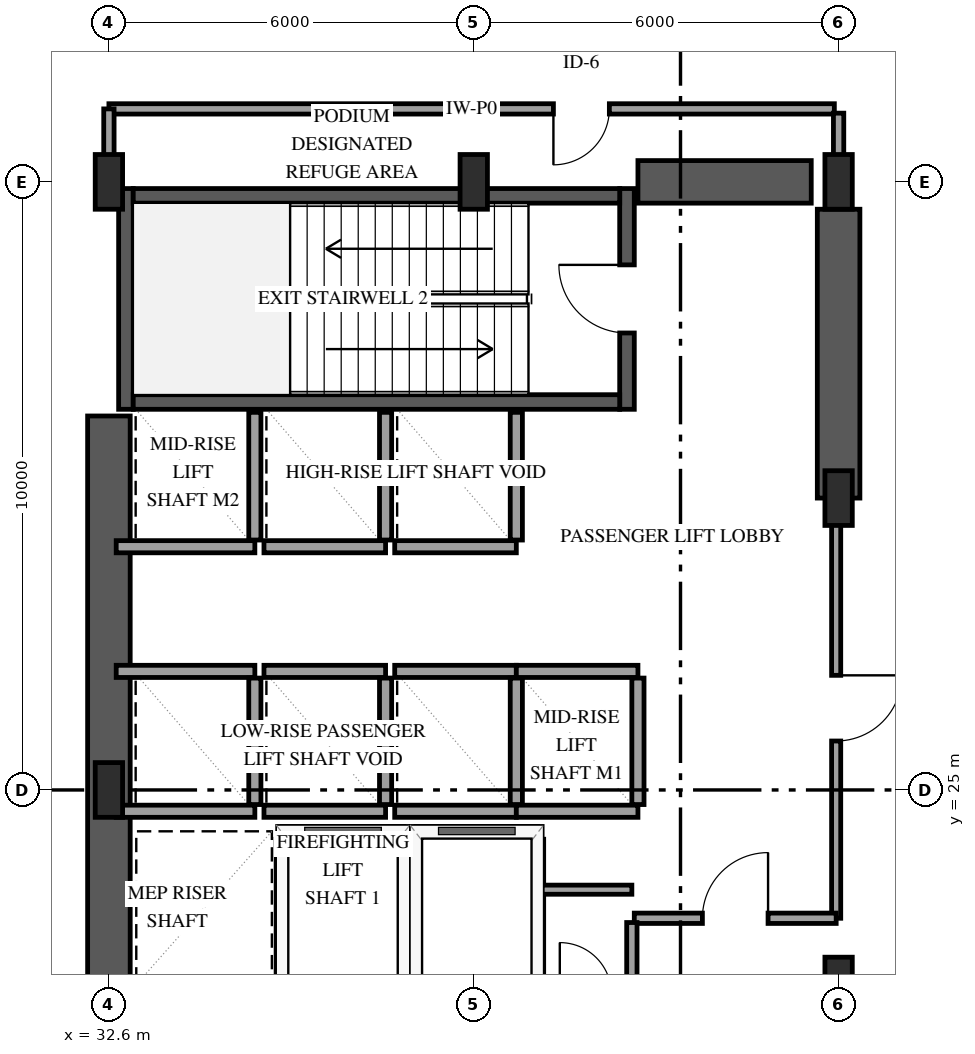
"""IFC4 building model, lengths in metres.
Left out: names, types, materials, properties, quantities, classifications, styles, units other than length and angle.
Written with IfcOpenShell. Run it as: python <this file> out.ifc"""

import sys

from ifc_helpers import new_model, si_unit, direction, frame, frame_2d, origin, origin_2d, place, context, subcontext, project, spatial, rectangle, extrude, element, fill, save


model = new_model("IFC4")
c1 = context("Model", 3, precision=1e-05, world=origin(), true_north=direction((0.0, 1.0)))
c2 = subcontext(c1, "Body", "Model", "MODEL_VIEW")
j1 = project(units=[si_unit("LENGTHUNIT", "METRE"), si_unit("PLANEANGLEUNIT", "RADIAN")], contexts=[c1])
p1 = place(None, origin())
s1 = spatial("IfcSite", under=j1, at=p1, CompositionType="ELEMENT")
p2 = place(p1, origin())
s2 = spatial("IfcBuilding", under=s1, at=p2, CompositionType="ELEMENT")
p3 = place(p2, frame((0.0, 0.0, 25.2)))
s3 = spatial("IfcBuildingStorey", under=s2, at=p3, CompositionType="ELEMENT", Elevation=25.2)
p4 = place(p3, frame((32.88, 31.26, 0.0), z_axis=(0.0, 0.0, 1.0), x_axis=(0.0, 1.0, 0.0)))
e1 = element("IfcWall", 1, at=p4, inside=s3, PredefinedType="SHEAR", context=c2, shape_type="SweptSolid", body=[
    extrude(rectangle(XDim=3.63, YDim=0.24, at=frame_2d((1.815, 0.0))), origin(), (0.0, 0.0, 1.0), 5.4),
])
p5 = place(p3, frame((41.12, 31.26, 0.0), z_axis=(0.0, 0.0, 1.0), x_axis=(0.0, 1.0, 0.0)))
e2 = element("IfcWall", 2, at=p5, inside=s3, PredefinedType="SHEAR", context=c2, shape_type="SweptSolid", body=[
    extrude(rectangle(XDim=3.63, YDim=0.24, at=frame_2d((1.815, 0.0))), origin(), (0.0, 0.0, 1.0), 5.4),
])
p6 = place(p5, frame((1.255, 0.0, 0.0)))
e3 = element("IfcOpeningElement", 3, at=p6, cuts=e2, PredefinedType="OPENING", context=c2, shape_type="SweptSolid", body=[
    extrude(rectangle(XDim=1.12, YDim=2.15, at=frame_2d((0.56, 1.075))), frame((0.0, 0.13, 0.0), z_axis=(0.0, -1.0, 0.0), x_axis=(1.0, 0.0, 0.0)), (0.0, 0.0, 1.0), 0.26),
])
for number, where, z_axis, x_axis in (
    (4, (33.0, 31.38, 0.0), (0.0, 0.0, 1.0), (1.0, 0.0, 0.0)),
    (5, (33.0, 34.77, 0.0), (0.0, 0.0, 1.0), (1.0, 0.0, 0.0)),
):
    element("IfcWall", number, at=place(p3, frame(where, z_axis=z_axis, x_axis=x_axis)), inside=s3, PredefinedType="SHEAR", context=c2, shape_type="SweptSolid", body=[
        extrude(rectangle(XDim=8.0, YDim=0.24, at=frame_2d((4.0, 0.0))), origin(), (0.0, 0.0, 1.0), 5.4),
    ])
p7 = place(p3, frame((32.6, 18.85, 0.0), z_axis=(0.0, 0.0, 1.0), x_axis=(0.0, 1.0, 0.0)))
e6 = element("IfcWall", 6, at=p7, inside=s3, PredefinedType="SHEAR", context=c2, shape_type="SweptSolid", body=[
    extrude(rectangle(XDim=12.3, YDim=0.7, at=frame_2d((6.15, 0.0))), origin(), (0.0, 0.0, 1.0), 5.4),
])
p8 = place(p3, frame((41.3, 35.0, 0.0), z_axis=(0.0, 0.0, 1.0), x_axis=(1.0, 0.0, 0.0)))
e7 = element("IfcWall", 7, at=p8, inside=s3, PredefinedType="SHEAR", context=c2, shape_type="SweptSolid", body=[
    extrude(rectangle(XDim=2.85, YDim=0.7, at=frame_2d((1.425, 0.0))), origin(), (0.0, 0.0, 1.0), 5.4),
])
p9 = place(p3, frame((44.6, 29.8, 0.0), z_axis=(0.0, 0.0, 1.0), x_axis=(0.0, 1.0, 0.0)))
e8 = element("IfcWall", 8, at=p9, inside=s3, PredefinedType="SHEAR", context=c2, shape_type="SweptSolid", body=[
    extrude(rectangle(XDim=4.75, YDim=0.7, at=frame_2d((2.375, 0.0))), origin(), (0.0, 0.0, 1.0), 5.4),
])
for number, where, z_axis, x_axis in (
    (9, (32.6, 25.0, 0.0), (0.0, 0.0, 1.0), (1.0, 0.0, 0.0)),
    (10, (32.6, 35.0, 0.0), (0.0, 0.0, 1.0), (1.0, 0.0, 0.0)),
    (11, (38.6, 35.0, 0.0), (0.0, 0.0, 1.0), (1.0, 0.0, 0.0)),
    (12, (44.6, 21.8, 0.0), (0.0, 0.0, 1.0), (1.0, 0.0, 0.0)),
    (13, (44.6, 29.8, 0.0), (0.0, 0.0, 1.0), (1.0, 0.0, 0.0)),
    (14, (44.6, 35.0, 0.0), (0.0, 0.0, 1.0), (1.0, 0.0, 0.0)),
):
    element("IfcColumn", number, at=place(p3, frame(where, z_axis=z_axis, x_axis=x_axis)), inside=s3, PredefinedType="PILASTER", context=c2, shape_type="SweptSolid", body=[
        extrude(rectangle(XDim=0.45, YDim=0.9, at=origin_2d()), origin(), (0.0, 0.0, 1.0), 5.1),
    ])
p10 = place(p3, frame((35.45, 24.3, 0.0), z_axis=(0.0, 0.0, 1.0), x_axis=(1.0, 0.0, 0.0)))
e15 = element("IfcWall", 15, at=p10, inside=s3, PredefinedType="SOLIDWALL", context=c2, shape_type="SweptSolid", body=[
    extrude(rectangle(XDim=2.0, YDim=0.2, at=frame_2d((1.0, 0.0))), origin(), (0.0, 0.0, 1.0), 5.1),
])
for number, where, z_axis, x_axis in (
    (16, (35.45, 21.81, 0.0), (0.0, 0.0, 1.0), (0.0, 1.0, 0.0)),
    (17, (37.45, 21.81, 0.0), (0.0, 0.0, 1.0), (0.0, 1.0, 0.0)),
):
    element("IfcWall", number, at=place(p3, frame(where, z_axis=z_axis, x_axis=x_axis)), inside=s3, PredefinedType="SOLIDWALL", context=c2, shape_type="SweptSolid", body=[
        extrude(rectangle(XDim=2.38, YDim=0.2, at=frame_2d((1.19, 0.0))), origin(), (0.0, 0.0, 1.0), 5.1),
    ])
p11 = place(p3, frame((37.65, 24.3, 0.0), z_axis=(0.0, 0.0, 1.0), x_axis=(1.0, 0.0, 0.0)))
e18 = element("IfcWall", 18, at=p11, inside=s3, PredefinedType="SOLIDWALL", context=c2, shape_type="SweptSolid", body=[
    extrude(rectangle(XDim=2.0, YDim=0.2, at=frame_2d((1.0, 0.0))), origin(), (0.0, 0.0, 1.0), 5.1),
])
p12 = place(p3, frame((39.65, 21.81, 0.0), z_axis=(0.0, 0.0, 1.0), x_axis=(0.0, 1.0, 0.0)))
e19 = element("IfcWall", 19, at=p12, inside=s3, PredefinedType="SOLIDWALL", context=c2, shape_type="SweptSolid", body=[
    extrude(rectangle(XDim=2.38, YDim=0.2, at=frame_2d((1.19, 0.0))), origin(), (0.0, 0.0, 1.0), 5.1),
])
for number, where, z_axis, x_axis in (
    (20, (32.72, 24.65, 0.0), (0.0, 0.0, 1.0), (1.0, 0.0, 0.0)),
    (21, (32.72, 26.95, 0.0), (0.0, 0.0, 1.0), (1.0, 0.0, 0.0)),
):
    element("IfcWall", number, at=place(p3, frame(where, z_axis=z_axis, x_axis=x_axis)), inside=s3, PredefinedType="SOLIDWALL", context=c2, shape_type="SweptSolid", body=[
        extrude(rectangle(XDim=2.28, YDim=0.2, at=frame_2d((1.14, 0.0))), origin(), (0.0, 0.0, 1.0), 5.1),
    ])
p13 = place(p3, frame((35.0, 24.76, 0.0), z_axis=(0.0, 0.0, 1.0), x_axis=(0.0, 1.0, 0.0)))
e22 = element("IfcWall", 22, at=p13, inside=s3, PredefinedType="SOLIDWALL", context=c2, shape_type="SweptSolid", body=[
    extrude(rectangle(XDim=2.08, YDim=0.2, at=frame_2d((1.04, 0.0))), origin(), (0.0, 0.0, 1.0), 5.1),
])
for number, where, z_axis, x_axis in (
    (23, (35.15, 24.65, 0.0), (0.0, 0.0, 1.0), (1.0, 0.0, 0.0)),
    (24, (35.15, 26.95, 0.0), (0.0, 0.0, 1.0), (1.0, 0.0, 0.0)),
):
    element("IfcWall", number, at=place(p3, frame(where, z_axis=z_axis, x_axis=x_axis)), inside=s3, PredefinedType="SOLIDWALL", context=c2, shape_type="SweptSolid", body=[
        extrude(rectangle(XDim=2.0, YDim=0.2, at=frame_2d((1.0, 0.0))), origin(), (0.0, 0.0, 1.0), 5.1),
    ])
p14 = place(p3, frame((37.15, 24.76, 0.0), z_axis=(0.0, 0.0, 1.0), x_axis=(0.0, 1.0, 0.0)))
e25 = element("IfcWall", 25, at=p14, inside=s3, PredefinedType="SOLIDWALL", context=c2, shape_type="SweptSolid", body=[
    extrude(rectangle(XDim=2.08, YDim=0.2, at=frame_2d((1.04, 0.0))), origin(), (0.0, 0.0, 1.0), 5.1),
])
for number, where, z_axis, x_axis in (
    (26, (37.3, 24.65, 0.0), (0.0, 0.0, 1.0), (1.0, 0.0, 0.0)),
    (27, (37.3, 26.95, 0.0), (0.0, 0.0, 1.0), (1.0, 0.0, 0.0)),
):
    element("IfcWall", number, at=place(p3, frame(where, z_axis=z_axis, x_axis=x_axis)), inside=s3, PredefinedType="SOLIDWALL", context=c2, shape_type="SweptSolid", body=[
        extrude(rectangle(XDim=2.0, YDim=0.2, at=frame_2d((1.0, 0.0))), origin(), (0.0, 0.0, 1.0), 5.1),
    ])
p15 = place(p3, frame((39.3, 24.76, 0.0), z_axis=(0.0, 0.0, 1.0), x_axis=(0.0, 1.0, 0.0)))
e28 = element("IfcWall", 28, at=p15, inside=s3, PredefinedType="SOLIDWALL", context=c2, shape_type="SweptSolid", body=[
    extrude(rectangle(XDim=2.08, YDim=0.2, at=frame_2d((1.04, 0.0))), origin(), (0.0, 0.0, 1.0), 5.1),
])
for number, where, z_axis, x_axis in (
    (29, (39.3, 24.65, 0.0), (0.0, 0.0, 1.0), (1.0, 0.0, 0.0)),
    (30, (39.3, 26.95, 0.0), (0.0, 0.0, 1.0), (1.0, 0.0, 0.0)),
):
    element("IfcWall", number, at=place(p3, frame(where, z_axis=z_axis, x_axis=x_axis)), inside=s3, PredefinedType="SOLIDWALL", context=c2, shape_type="SweptSolid", body=[
        extrude(rectangle(XDim=2.0, YDim=0.2, at=frame_2d((1.0, 0.0))), origin(), (0.0, 0.0, 1.0), 5.1),
    ])
p16 = place(p3, frame((41.3, 24.76, 0.0), z_axis=(0.0, 0.0, 1.0), x_axis=(0.0, 1.0, 0.0)))
e31 = element("IfcWall", 31, at=p16, inside=s3, PredefinedType="SOLIDWALL", context=c2, shape_type="SweptSolid", body=[
    extrude(rectangle(XDim=2.08, YDim=0.2, at=frame_2d((1.04, 0.0))), origin(), (0.0, 0.0, 1.0), 5.1),
])
p17 = place(p3, frame((32.72, 29.0, 0.0), z_axis=(0.0, 0.0, 1.0), x_axis=(1.0, 0.0, 0.0)))
e32 = element("IfcWall", 32, at=p17, inside=s3, PredefinedType="SOLIDWALL", context=c2, shape_type="SweptSolid", body=[
    extrude(rectangle(XDim=2.28, YDim=0.2, at=frame_2d((1.14, 0.0))), origin(), (0.0, 0.0, 1.0), 5.1),
])
p18 = place(p3, frame((35.0, 29.11, 0.0), z_axis=(0.0, 0.0, 1.0), x_axis=(0.0, 1.0, 0.0)))
e33 = element("IfcWall", 33, at=p18, inside=s3, PredefinedType="SOLIDWALL", context=c2, shape_type="SweptSolid", body=[
    extrude(rectangle(XDim=2.1, YDim=0.2, at=frame_2d((1.05, 0.0))), origin(), (0.0, 0.0, 1.0), 5.1),
])
p19 = place(p3, frame((35.15, 29.0, 0.0), z_axis=(0.0, 0.0, 1.0), x_axis=(1.0, 0.0, 0.0)))
e34 = element("IfcWall", 34, at=p19, inside=s3, PredefinedType="SOLIDWALL", context=c2, shape_type="SweptSolid", body=[
    extrude(rectangle(XDim=2.0, YDim=0.2, at=frame_2d((1.0, 0.0))), origin(), (0.0, 0.0, 1.0), 5.1),
])
p20 = place(p3, frame((37.15, 29.11, 0.0), z_axis=(0.0, 0.0, 1.0), x_axis=(0.0, 1.0, 0.0)))
e35 = element("IfcWall", 35, at=p20, inside=s3, PredefinedType="SOLIDWALL", context=c2, shape_type="SweptSolid", body=[
    extrude(rectangle(XDim=2.1, YDim=0.2, at=frame_2d((1.05, 0.0))), origin(), (0.0, 0.0, 1.0), 5.1),
])
p21 = place(p3, frame((37.3, 29.0, 0.0), z_axis=(0.0, 0.0, 1.0), x_axis=(1.0, 0.0, 0.0)))
e36 = element("IfcWall", 36, at=p21, inside=s3, PredefinedType="SOLIDWALL", context=c2, shape_type="SweptSolid", body=[
    extrude(rectangle(XDim=2.0, YDim=0.2, at=frame_2d((1.0, 0.0))), origin(), (0.0, 0.0, 1.0), 5.1),
])
p22 = place(p3, frame((39.3, 29.11, 0.0), z_axis=(0.0, 0.0, 1.0), x_axis=(0.0, 1.0, 0.0)))
e37 = element("IfcWall", 37, at=p22, inside=s3, PredefinedType="SOLIDWALL", context=c2, shape_type="SweptSolid", body=[
    extrude(rectangle(XDim=2.1, YDim=0.2, at=frame_2d((1.05, 0.0))), origin(), (0.0, 0.0, 1.0), 5.1),
])
p23 = place(p3, frame((44.53, 36.2, 0.0), z_axis=(0.0, 0.0, 1.0), x_axis=(-1.0, 0.0, 0.0)))
e38 = element("IfcWall", 38, at=p23, inside=s3, PredefinedType="PARTITIONING", context=c2, shape_type="SweptSolid", body=[
    extrude(rectangle(XDim=11.93, YDim=0.17, at=frame_2d((5.965, 0.0))), origin(), (0.0, 0.0, 1.0), 5.1),
])
p24 = place(p23, frame((3.7, 0.0, 0.0)))
e39 = element("IfcOpeningElement", 39, at=p24, cuts=e38, PredefinedType="OPENING", context=c2, shape_type="SweptSolid", body=[
    extrude(rectangle(XDim=0.92, YDim=2.12, at=frame_2d((0.46, 1.06))), frame((0.0, 0.095, 0.0), z_axis=(0.0, -1.0, 0.0), x_axis=(1.0, 0.0, 0.0)), (0.0, 0.0, 1.0), 0.19),
])
p25 = place(p3, frame((44.56, 29.8, 0.0), z_axis=(0.0, 0.0, 1.0), x_axis=(0.0, -1.0, 0.0)))
e40 = element("IfcWall", 40, at=p25, inside=s3, PredefinedType="PARTITIONING", context=c2, shape_type="SweptSolid", body=[
    extrude(rectangle(XDim=6.91, YDim=0.15, at=frame_2d((3.455, 0.0))), origin(), (0.0, 0.0, 1.0), 4.14),
])
p26 = place(p25, frame((2.915, 0.0, 0.0)))
e41 = element("IfcOpeningElement", 41, at=p26, cuts=e40, PredefinedType="OPENING", context=c2, shape_type="SweptSolid", body=[
    extrude(rectangle(XDim=1.08, YDim=2.15, at=frame_2d((0.54, 1.075))), frame((0.0, 0.085, 0.0), z_axis=(0.0, -1.0, 0.0), x_axis=(1.0, 0.0, 0.0)), (0.0, 0.0, 1.0), 0.17),
])
p27 = place(p3, frame((41.24, 22.89, 0.0), z_axis=(0.0, 0.0, 1.0), x_axis=(1.0, 0.0, 0.0)))
e42 = element("IfcWall", 42, at=p27, inside=s3, PredefinedType="PARTITIONING", context=c2, shape_type="SweptSolid", body=[
    extrude(rectangle(XDim=3.32, YDim=0.17, at=frame_2d((1.66, 0.0))), origin(), (0.0, 0.0, 1.0), 5.1),
])
p28 = place(p27, frame((1.12, 0.0, 0.0)))
e43 = element("IfcOpeningElement", 43, at=p28, cuts=e42, PredefinedType="OPENING", context=c2, shape_type="SweptSolid", body=[
    extrude(rectangle(XDim=1.08, YDim=2.15, at=frame_2d((0.54, 1.075))), frame((0.0, 0.095, 0.0), z_axis=(0.0, -1.0, 0.0), x_axis=(1.0, 0.0, 0.0)), (0.0, 0.0, 1.0), 0.19),
])
p29 = place(p3, frame((32.6, 36.2, 0.0), z_axis=(0.0, 0.0, 1.0), x_axis=(0.0, -1.0, 0.0)))
e44 = element("IfcWall", 44, at=p29, inside=s3, PredefinedType="PARTITIONING", context=c2, shape_type="SweptSolid", body=[
    extrude(rectangle(XDim=1.13, YDim=0.17, at=frame_2d((0.565, 0.0))), origin(), (0.0, 0.0, 1.0), 4.222),
])
p30 = place(p3, frame((41.2, 21.7, 0.0), z_axis=(0.0, 0.0, 1.0), x_axis=(0.0, 1.0, 0.0)))
e45 = element("IfcWall", 45, at=p30, inside=s3, PredefinedType="PARTITIONING", context=c2, shape_type="SweptSolid", body=[
    extrude(rectangle(XDim=1.12, YDim=0.17, at=frame_2d((0.56, 0.0))), origin(), (0.0, 0.0, 1.0), 5.1),
])
p31 = place(p3, frame((44.6, 35.07, 0.0), z_axis=(0.0, 0.0, 1.0), x_axis=(0.0, 1.0, 0.0)))
e46 = element("IfcWall", 46, at=p31, inside=s3, PredefinedType="PARTITIONING", context=c2, shape_type="SweptSolid", body=[
    extrude(rectangle(XDim=1.06, YDim=0.17, at=frame_2d((0.53, 0.0))), origin(), (0.0, 0.0, 1.0), 4.222),
])
p32 = place(p3, frame((41.2, 23.36, 0.0), z_axis=(0.0, 0.0, 1.0), x_axis=(-1.0, 0.0, 0.0)))
e47 = element("IfcWall", 47, at=p32, inside=s3, PredefinedType="PARTITIONING", context=c2, shape_type="SweptSolid", body=[
    extrude(rectangle(XDim=1.48, YDim=0.15, at=frame_2d((0.74, 0.0))), origin(), (0.0, 0.0, 1.0), 5.1),
])
p33 = place(p6, origin())
e48 = element("IfcDoor", 48, at=p33, inside=s3, OperationType="SINGLE_SWING_RIGHT", PredefinedType="DOOR", context=c2, shape_type="SweptSolid", body=[
    extrude(rectangle(XDim=1.12, YDim=2.15, at=frame_2d((0.56, 1.075))), frame((0.0, 0.025, 0.0), z_axis=(0.0, -1.0, 0.0), x_axis=(1.0, 0.0, 0.0)), (0.0, 0.0, 1.0), 0.05),
])
fill(e3, e48)
p34 = place(p24, origin())
e49 = element("IfcDoor", 49, at=p34, inside=s3, OperationType="SINGLE_SWING_RIGHT", PredefinedType="DOOR", context=c2, shape_type="SweptSolid", body=[
    extrude(rectangle(XDim=0.92, YDim=2.12, at=frame_2d((0.46, 1.06))), frame((0.0, 0.025, 0.0), z_axis=(0.0, -1.0, 0.0), x_axis=(1.0, 0.0, 0.0)), (0.0, 0.0, 1.0), 0.05),
])
fill(e39, e49)
p35 = place(p26, origin())
e50 = element("IfcDoor", 50, at=p35, inside=s3, OperationType="SINGLE_SWING_LEFT", PredefinedType="DOOR", context=c2, shape_type="SweptSolid", body=[
    extrude(rectangle(XDim=1.08, YDim=2.15, at=frame_2d((0.54, 1.075))), frame((0.0, 0.025, 0.0), z_axis=(0.0, -1.0, 0.0), x_axis=(1.0, 0.0, 0.0)), (0.0, 0.0, 1.0), 0.05),
])
fill(e41, e50)
p36 = place(p28, origin())
e51 = element("IfcDoor", 51, at=p36, inside=s3, OperationType="SINGLE_SWING_RIGHT", PredefinedType="DOOR", context=c2, shape_type="SweptSolid", body=[
    extrude(rectangle(XDim=1.08, YDim=2.15, at=frame_2d((0.54, 1.075))), frame((0.0, 0.025, 0.0), z_axis=(0.0, -1.0, 0.0), x_axis=(1.0, 0.0, 0.0)), (0.0, 0.0, 1.0), 0.05),
])
fill(e43, e51)
save(model, sys.argv[1])
